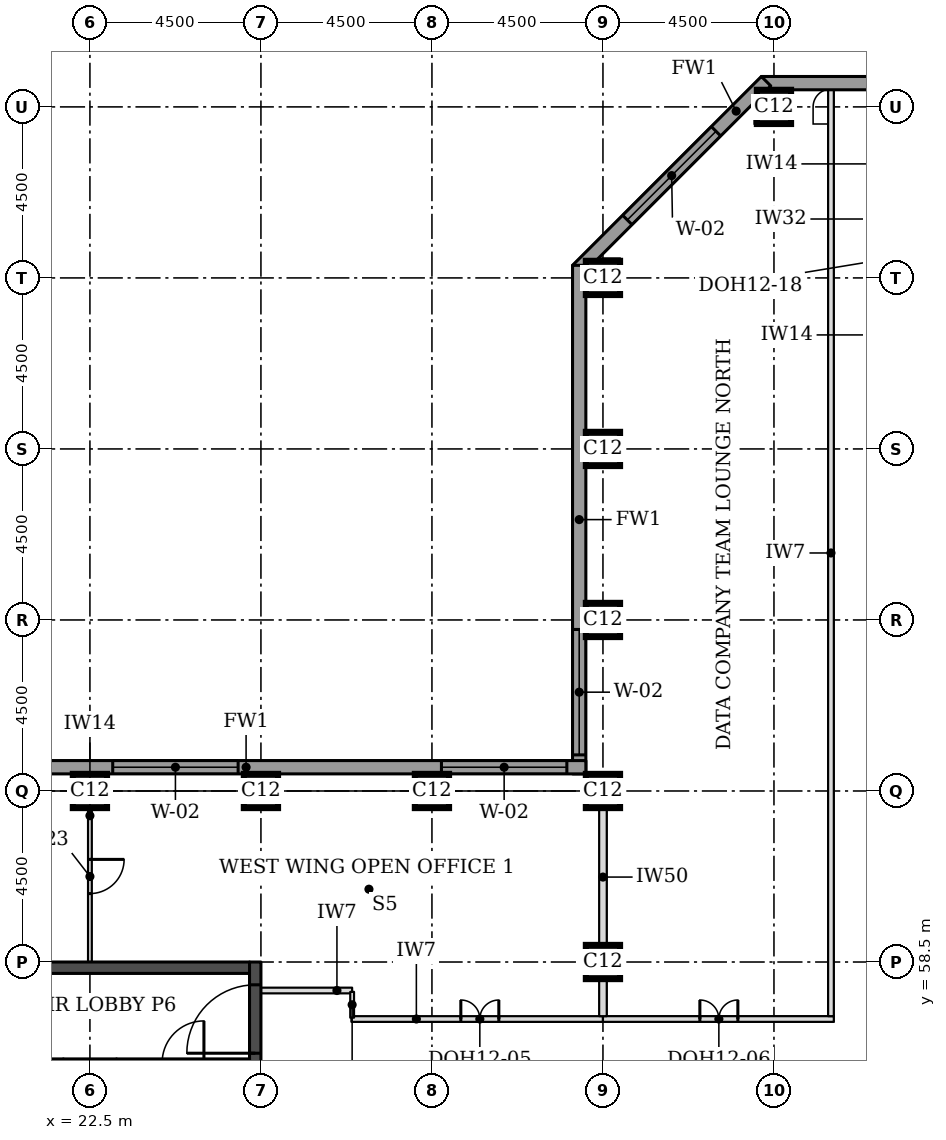
"""IFC4 building model, lengths in metres.
Left out: names, types, materials, properties, quantities, classifications, styles, units other than length and angle.
Written with IfcOpenShell. Run it as: python <this file> out.ifc"""

import sys

from ifc_helpers import new_model, si_unit, direction, frame, frame_2d, origin, origin_2d, place, context, subcontext, project, spatial, rectangle, extrude, element, fill, save


model = new_model("IFC4")
c1 = context("Model", 3, precision=1e-05, world=origin(), true_north=direction((0.0, 1.0)))
c2 = subcontext(c1, "Body", "Model", "MODEL_VIEW")
j1 = project(units=[si_unit("LENGTHUNIT", "METRE"), si_unit("PLANEANGLEUNIT", "RADIAN")], contexts=[c1])
p1 = place(None, origin())
s1 = spatial("IfcSite", under=j1, at=p1, CompositionType="ELEMENT")
p2 = place(p1, origin())
s2 = spatial("IfcBuilding", under=s1, at=p2, CompositionType="ELEMENT")
p3 = place(p2, frame((0.0, 0.0, 245.2)))
s3 = spatial("IfcBuildingStorey", under=s2, at=p3, CompositionType="ELEMENT", Elevation=245.2)
for number, where, z_axis, x_axis in (
    (1, (36.0, 58.5, 0.0), (0.0, 0.0, 1.0), (1.0, 0.0, 0.0)),
    (2, (22.5, 63.0, 0.0), (0.0, 0.0, 1.0), (1.0, 0.0, 0.0)),
    (3, (27.0, 63.0, 0.0), (0.0, 0.0, 1.0), (1.0, 0.0, 0.0)),
    (4, (31.5, 63.0, 0.0), (0.0, 0.0, 1.0), (1.0, 0.0, 0.0)),
    (5, (36.0, 63.0, 0.0), (0.0, 0.0, 1.0), (1.0, 0.0, 0.0)),
    (6, (36.0, 67.5, 0.0), (0.0, 0.0, 1.0), (1.0, 0.0, 0.0)),
    (7, (36.0, 72.0, 0.0), (0.0, 0.0, 1.0), (1.0, 0.0, 0.0)),
    (8, (36.0, 76.5, 0.0), (0.0, 0.0, 1.0), (1.0, 0.0, 0.0)),
    (9, (40.5, 81.0, 0.0), (0.0, 0.0, 1.0), (1.0, 0.0, 0.0)),
):
    element("IfcColumn", number, at=place(p3, frame(where, z_axis=z_axis, x_axis=x_axis)), inside=s3, PredefinedType="COLUMN", context=c2, shape_type="SweptSolid", body=[
        extrude(rectangle(XDim=0.9, YDim=0.9, at=origin_2d()), origin(), (0.0, 0.0, 1.0), 3.7),
    ])
p4 = place(p3, frame((18.3, 58.35, 0.0), z_axis=(0.0, 0.0, 1.0), x_axis=(1.0, 0.0, 0.0)))
e10 = element("IfcWall", 10, at=p4, inside=s3, PredefinedType="SHEAR", context=c2, shape_type="SweptSolid", body=[
    extrude(rectangle(XDim=8.4, YDim=0.3, at=frame_2d((4.2, 0.0))), origin(), (0.0, 0.0, 1.0), 3.7),
])
p5 = place(p3, frame((26.85, 49.5, 0.0), z_axis=(0.0, 0.0, 1.0), x_axis=(0.0, 1.0, 0.0)))
e11 = element("IfcWall", 11, at=p5, inside=s3, PredefinedType="SHEAR", context=c2, shape_type="SweptSolid", body=[
    extrude(rectangle(XDim=9.0, YDim=0.3, at=frame_2d((4.5, 0.0))), origin(), (0.0, 0.0, 1.0), 3.7),
])
p6 = place(p5, frame((6.6, 0.0, 0.0)))
e12 = element("IfcOpeningElement", 12, at=p6, cuts=e11, PredefinedType="OPENING", context=c2, shape_type="SweptSolid", body=[
    extrude(rectangle(XDim=1.8, YDim=2.1, at=frame_2d((0.9, 1.05))), frame((0.0, 0.16, 0.0), z_axis=(0.0, -1.0, 0.0), x_axis=(1.0, 0.0, 0.0)), (0.0, 0.0, 1.0), 0.32),
])
p7 = place(p3, frame((72.331, 81.625, 0.0), z_axis=(0.0, 0.0, 1.0), x_axis=(-1.0, 0.0, 0.0)))
e13 = element("IfcWall", 13, at=p7, inside=s3, PredefinedType="STANDARD", context=c2, shape_type="SweptSolid", body=[
    extrude(rectangle(XDim=32.163, YDim=0.35, at=frame_2d((16.081, 0.0))), origin(), (0.0, 0.0, 1.0), 3.525),
])
p8 = place(p7, frame((5.431, 0.0, 0.9)))
e14 = element("IfcOpeningElement", 14, at=p8, cuts=e13, PredefinedType="OPENING", context=c2, shape_type="SweptSolid", body=[
    extrude(rectangle(XDim=3.3, YDim=1.9, at=frame_2d((1.65, 0.95))), frame((0.0, 0.185, 0.0), z_axis=(0.0, -1.0, 0.0), x_axis=(1.0, 0.0, 0.0)), (0.0, 0.0, 1.0), 0.37),
])
p9 = place(p7, frame((9.931, 0.0, 0.9)))
e15 = element("IfcOpeningElement", 15, at=p9, cuts=e13, PredefinedType="OPENING", context=c2, shape_type="SweptSolid", body=[
    extrude(rectangle(XDim=3.3, YDim=1.9, at=frame_2d((1.65, 0.95))), frame((0.0, 0.185, 0.0), z_axis=(0.0, -1.0, 0.0), x_axis=(1.0, 0.0, 0.0)), (0.0, 0.0, 1.0), 0.37),
])
p10 = place(p7, frame((14.431, 0.0, 0.9)))
e16 = element("IfcOpeningElement", 16, at=p10, cuts=e13, PredefinedType="OPENING", context=c2, shape_type="SweptSolid", body=[
    extrude(rectangle(XDim=3.3, YDim=1.9, at=frame_2d((1.65, 0.95))), frame((0.0, 0.185, 0.0), z_axis=(0.0, -1.0, 0.0), x_axis=(1.0, 0.0, 0.0)), (0.0, 0.0, 1.0), 0.37),
])
p11 = place(p7, frame((18.931, 0.0, 0.9)))
e17 = element("IfcOpeningElement", 17, at=p11, cuts=e13, PredefinedType="OPENING", context=c2, shape_type="SweptSolid", body=[
    extrude(rectangle(XDim=3.3, YDim=1.9, at=frame_2d((1.65, 0.95))), frame((0.0, 0.185, 0.0), z_axis=(0.0, -1.0, 0.0), x_axis=(1.0, 0.0, 0.0)), (0.0, 0.0, 1.0), 0.37),
])
p12 = place(p7, frame((23.431, 0.0, 0.9)))
e18 = element("IfcOpeningElement", 18, at=p12, cuts=e13, PredefinedType="OPENING", context=c2, shape_type="SweptSolid", body=[
    extrude(rectangle(XDim=3.3, YDim=1.9, at=frame_2d((1.65, 0.95))), frame((0.0, 0.185, 0.0), z_axis=(0.0, -1.0, 0.0), x_axis=(1.0, 0.0, 0.0)), (0.0, 0.0, 1.0), 0.37),
])
p13 = place(p3, frame((40.292, 81.676, 0.0), z_axis=(0.0, 0.0, 1.0), x_axis=(-0.707106781187, -0.707106781187, 0.0)))
e19 = element("IfcWall", 19, at=p13, inside=s3, PredefinedType="STANDARD", context=c2, shape_type="SweptSolid", body=[
    extrude(rectangle(XDim=7.027, YDim=0.35, at=frame_2d((3.513, 0.0))), origin(), (0.0, 0.0, 1.0), 3.525),
])
p14 = place(p13, frame((1.863, 0.0, 0.9)))
e20 = element("IfcOpeningElement", 20, at=p14, cuts=e19, PredefinedType="OPENING", context=c2, shape_type="SweptSolid", body=[
    extrude(rectangle(XDim=3.3, YDim=1.9, at=frame_2d((1.65, 0.95))), frame((0.0, 0.185, 0.0), z_axis=(0.0, -1.0, 0.0), x_axis=(1.0, 0.0, 0.0)), (0.0, 0.0, 1.0), 0.37),
])
p15 = place(p3, frame((35.375, 76.831, 0.0), z_axis=(0.0, 0.0, 1.0), x_axis=(0.0, -1.0, 0.0)))
e21 = element("IfcWall", 21, at=p15, inside=s3, PredefinedType="STANDARD", context=c2, shape_type="SweptSolid", body=[
    extrude(rectangle(XDim=13.381, YDim=0.35, at=frame_2d((6.691, 0.0))), origin(), (0.0, 0.0, 1.0), 3.525),
])
p16 = place(p15, frame((9.581, 0.0, 0.9)))
e22 = element("IfcOpeningElement", 22, at=p16, cuts=e21, PredefinedType="OPENING", context=c2, shape_type="SweptSolid", body=[
    extrude(rectangle(XDim=3.3, YDim=1.9, at=frame_2d((1.65, 0.95))), frame((0.0, 0.185, 0.0), z_axis=(0.0, -1.0, 0.0), x_axis=(1.0, 0.0, 0.0)), (0.0, 0.0, 1.0), 0.37),
])
p17 = place(p3, frame((35.55, 63.625, 0.0), z_axis=(0.0, 0.0, 1.0), x_axis=(-1.0, 0.0, 0.0)))
e23 = element("IfcWall", 23, at=p17, inside=s3, PredefinedType="STANDARD", context=c2, shape_type="SweptSolid", body=[
    extrude(rectangle(XDim=17.881, YDim=0.35, at=frame_2d((8.941, 0.0))), origin(), (0.0, 0.0, 1.0), 3.525),
])
p18 = place(p17, frame((0.5, 0.0, 0.9)))
e24 = element("IfcOpeningElement", 24, at=p18, cuts=e23, PredefinedType="OPENING", context=c2, shape_type="SweptSolid", body=[
    extrude(rectangle(XDim=3.3, YDim=1.9, at=frame_2d((1.65, 0.95))), frame((0.0, 0.185, 0.0), z_axis=(0.0, -1.0, 0.0), x_axis=(1.0, 0.0, 0.0)), (0.0, 0.0, 1.0), 0.37),
])
p19 = place(p17, frame((9.15, 0.0, 0.9)))
e25 = element("IfcOpeningElement", 25, at=p19, cuts=e23, PredefinedType="OPENING", context=c2, shape_type="SweptSolid", body=[
    extrude(rectangle(XDim=3.3, YDim=1.9, at=frame_2d((1.65, 0.95))), frame((0.0, 0.185, 0.0), z_axis=(0.0, -1.0, 0.0), x_axis=(1.0, 0.0, 0.0)), (0.0, 0.0, 1.0), 0.37),
])
p20 = place(p3, frame((29.38, 57.0, 0.0), z_axis=(0.0, 0.0, 1.0), x_axis=(1.0, 0.0, 0.0)))
e26 = element("IfcWall", 26, at=p20, inside=s3, PredefinedType="PARTITIONING", context=c2, shape_type="SweptSolid", body=[
    extrude(rectangle(XDim=6.62, YDim=0.15, at=frame_2d((3.31, 0.0))), origin(), (0.0, 0.0, 1.0), 3.55),
])
p21 = place(p20, frame((2.88, 0.0, 0.0)))
e27 = element("IfcOpeningElement", 27, at=p21, cuts=e26, PredefinedType="OPENING", context=c2, shape_type="SweptSolid", body=[
    extrude(rectangle(XDim=1.0, YDim=2.1, at=frame_2d((0.5, 1.05))), frame((0.0, 0.085, 0.0), z_axis=(0.0, -1.0, 0.0), x_axis=(1.0, 0.0, 0.0)), (0.0, 0.0, 1.0), 0.17),
])
p22 = place(p3, frame((36.0, 57.0, 0.0), z_axis=(0.0, 0.0, 1.0), x_axis=(1.0, 0.0, 0.0)))
e28 = element("IfcWall", 28, at=p22, inside=s3, PredefinedType="PARTITIONING", context=c2, shape_type="SweptSolid", body=[
    extrude(rectangle(XDim=6.075, YDim=0.15, at=frame_2d((3.038, 0.0))), origin(), (0.0, 0.0, 1.0), 3.55),
])
p23 = place(p22, frame((2.55, 0.0, 0.0)))
e29 = element("IfcOpeningElement", 29, at=p23, cuts=e28, PredefinedType="OPENING", context=c2, shape_type="SweptSolid", body=[
    extrude(rectangle(XDim=1.0, YDim=2.1, at=frame_2d((0.5, 1.05))), frame((0.0, 0.085, 0.0), z_axis=(0.0, -1.0, 0.0), x_axis=(1.0, 0.0, 0.0)), (0.0, 0.0, 1.0), 0.17),
])
p24 = place(p3, frame((36.0, 57.075, 0.0), z_axis=(0.0, 0.0, 1.0), x_axis=(0.0, 1.0, 0.0)))
e30 = element("IfcWall", 30, at=p24, inside=s3, PredefinedType="PARTITIONING", context=c2, shape_type="SweptSolid", body=[
    extrude(rectangle(XDim=0.975, YDim=0.2, at=frame_2d((0.488, 0.0))), origin(), (0.0, 0.0, 1.0), 2.8),
])
p25 = place(p3, frame((42.0, 57.075, 0.0), z_axis=(0.0, 0.0, 1.0), x_axis=(0.0, 1.0, 0.0)))
e31 = element("IfcWall", 31, at=p25, inside=s3, PredefinedType="PARTITIONING", context=c2, shape_type="SweptSolid", body=[
    extrude(rectangle(XDim=24.375, YDim=0.15, at=frame_2d((12.188, 0.0))), origin(), (0.0, 0.0, 1.0), 3.55),
])
p26 = place(p3, frame((36.0, 58.92, 0.0), z_axis=(0.0, 0.0, 1.0), x_axis=(0.0, 1.0, 0.0)))
e32 = element("IfcWall", 32, at=p26, inside=s3, PredefinedType="PARTITIONING", context=c2, shape_type="SweptSolid", body=[
    extrude(rectangle(XDim=3.63, YDim=0.2, at=frame_2d((1.815, 0.0))), origin(), (0.0, 0.0, 1.0), 2.8),
])
p27 = place(p3, frame((22.5, 63.0, 0.0), z_axis=(0.0, 0.0, 1.0), x_axis=(0.0, -1.0, 0.0)))
e33 = element("IfcWall", 33, at=p27, inside=s3, PredefinedType="PARTITIONING", context=c2, shape_type="SweptSolid", body=[
    extrude(rectangle(XDim=4.5, YDim=0.1, at=frame_2d((2.25, 0.0))), origin(), (0.0, 0.0, 1.0), 3.55),
])
p28 = place(p27, frame((1.8, 0.0, 0.0)))
e34 = element("IfcOpeningElement", 34, at=p28, cuts=e33, PredefinedType="OPENING", context=c2, shape_type="SweptSolid", body=[
    extrude(rectangle(XDim=0.9, YDim=2.1, at=frame_2d((0.45, 1.05))), frame((0.0, 0.06, 0.0), z_axis=(0.0, -1.0, 0.0), x_axis=(1.0, 0.0, 0.0)), (0.0, 0.0, 1.0), 0.12),
])
p29 = place(p3, frame((27.0, 57.75, 0.0), z_axis=(0.0, 0.0, 1.0), x_axis=(1.0, 0.0, 0.0)))
e35 = element("IfcWall", 35, at=p29, inside=s3, PredefinedType="PARTITIONING", context=c2, shape_type="SweptSolid", body=[
    extrude(rectangle(XDim=2.4, YDim=0.15, at=frame_2d((1.2, 0.0))), origin(), (0.0, 0.0, 1.0), 3.55),
])
p30 = place(p3, frame((29.4, 57.715, 0.0), z_axis=(0.0, 0.0, 1.0), x_axis=(0.0, -1.0, 0.0)))
e36 = element("IfcWall", 36, at=p30, inside=s3, PredefinedType="PARTITIONING", context=c2, shape_type="SweptSolid", body=[
    extrude(rectangle(XDim=0.68, YDim=0.1, at=frame_2d((0.34, 0.0))), origin(), (0.0, 0.0, 1.0), 3.55),
])
p31 = place(p3, frame((21.8, 55.85, 0.0), z_axis=(0.0, 0.0, 1.0), x_axis=(1.0, 0.0, 0.0)))
e37 = element("IfcWall", 37, at=p31, inside=s3, PredefinedType="SOLIDWALL", context=c2, shape_type="SweptSolid", body=[
    extrude(rectangle(XDim=1.4, YDim=0.2, at=frame_2d((0.7, 0.0))), origin(), (0.0, 0.0, 1.0), 3.55),
])
p32 = place(p3, frame((18.3, 55.85, 0.0), z_axis=(0.0, 0.0, 1.0), x_axis=(1.0, 0.0, 0.0)))
e38 = element("IfcWall", 38, at=p32, inside=s3, PredefinedType="SOLIDWALL", context=c2, shape_type="SweptSolid", body=[
    extrude(rectangle(XDim=3.5, YDim=0.2, at=frame_2d((1.75, 0.0))), origin(), (0.0, 0.0, 1.0), 3.55),
])
p33 = place(p32, frame((1.2, 0.0, 0.0)))
e39 = element("IfcOpeningElement", 39, at=p33, cuts=e38, PredefinedType="OPENING", context=c2, shape_type="SweptSolid", body=[
    extrude(rectangle(XDim=1.1, YDim=2.1, at=frame_2d((0.55, 1.05))), frame((0.0, 0.11, 0.0), z_axis=(0.0, -1.0, 0.0), x_axis=(1.0, 0.0, 0.0)), (0.0, 0.0, 1.0), 0.22),
])
p34 = place(p3, frame((23.2, 55.85, 0.0), z_axis=(0.0, 0.0, 1.0), x_axis=(1.0, 0.0, 0.0)))
e40 = element("IfcWall", 40, at=p34, inside=s3, PredefinedType="SOLIDWALL", context=c2, shape_type="SweptSolid", body=[
    extrude(rectangle(XDim=3.5, YDim=0.2, at=frame_2d((1.75, 0.0))), origin(), (0.0, 0.0, 1.0), 3.55),
])
p35 = place(p34, frame((1.2, 0.0, 0.0)))
e41 = element("IfcOpeningElement", 41, at=p35, cuts=e40, PredefinedType="OPENING", context=c2, shape_type="SweptSolid", body=[
    extrude(rectangle(XDim=1.1, YDim=2.1, at=frame_2d((0.55, 1.05))), frame((0.0, 0.11, 0.0), z_axis=(0.0, -1.0, 0.0), x_axis=(1.0, 0.0, 0.0)), (0.0, 0.0, 1.0), 0.22),
])
p36 = place(p14, origin())
e42 = element("IfcWindow", 42, at=p36, inside=s3, PartitioningType="SINGLE_PANEL", PredefinedType="WINDOW", context=c2, shape_type="SweptSolid", body=[
    extrude(rectangle(XDim=3.3, YDim=1.9, at=frame_2d((1.65, 0.95))), frame((0.0, 0.085, 0.0), z_axis=(0.0, -1.0, 0.0), x_axis=(1.0, 0.0, 0.0)), (0.0, 0.0, 1.0), 0.06),
])
fill(e20, e42)
p37 = place(p16, origin())
e43 = element("IfcWindow", 43, at=p37, inside=s3, PartitioningType="SINGLE_PANEL", PredefinedType="WINDOW", context=c2, shape_type="SweptSolid", body=[
    extrude(rectangle(XDim=3.3, YDim=1.9, at=frame_2d((1.65, 0.95))), frame((0.0, 0.085, 0.0), z_axis=(0.0, -1.0, 0.0), x_axis=(1.0, 0.0, 0.0)), (0.0, 0.0, 1.0), 0.06),
])
fill(e22, e43)
p38 = place(p18, origin())
e44 = element("IfcWindow", 44, at=p38, inside=s3, PartitioningType="SINGLE_PANEL", PredefinedType="WINDOW", context=c2, shape_type="SweptSolid", body=[
    extrude(rectangle(XDim=3.3, YDim=1.9, at=frame_2d((1.65, 0.95))), frame((0.0, 0.085, 0.0), z_axis=(0.0, -1.0, 0.0), x_axis=(1.0, 0.0, 0.0)), (0.0, 0.0, 1.0), 0.06),
])
fill(e24, e44)
p39 = place(p19, origin())
e45 = element("IfcWindow", 45, at=p39, inside=s3, PartitioningType="SINGLE_PANEL", PredefinedType="WINDOW", context=c2, shape_type="SweptSolid", body=[
    extrude(rectangle(XDim=3.3, YDim=1.9, at=frame_2d((1.65, 0.95))), frame((0.0, 0.085, 0.0), z_axis=(0.0, -1.0, 0.0), x_axis=(1.0, 0.0, 0.0)), (0.0, 0.0, 1.0), 0.06),
])
fill(e25, e45)
p40 = place(p23, origin())
e46 = element("IfcDoor", 46, at=p40, inside=s3, OperationType="DOUBLE_DOOR_SINGLE_SWING", PredefinedType="DOOR", context=c2, shape_type="SweptSolid", body=[
    extrude(rectangle(XDim=1.0, YDim=2.1, at=frame_2d((0.5, 1.05))), frame((0.0, 0.025, 0.0), z_axis=(0.0, -1.0, 0.0), x_axis=(1.0, 0.0, 0.0)), (0.0, 0.0, 1.0), 0.05),
])
fill(e29, e46)
p41 = place(p21, origin())
e47 = element("IfcDoor", 47, at=p41, inside=s3, OperationType="DOUBLE_DOOR_SINGLE_SWING", PredefinedType="DOOR", context=c2, shape_type="SweptSolid", body=[
    extrude(rectangle(XDim=1.0, YDim=2.1, at=frame_2d((0.5, 1.05))), frame((0.0, 0.025, 0.0), z_axis=(0.0, -1.0, 0.0), x_axis=(1.0, 0.0, 0.0)), (0.0, 0.0, 1.0), 0.05),
])
fill(e27, e47)
p42 = place(p28, origin())
e48 = element("IfcDoor", 48, at=p42, inside=s3, OperationType="SINGLE_SWING_LEFT", PredefinedType="DOOR", context=c2, shape_type="SweptSolid", body=[
    extrude(rectangle(XDim=0.9, YDim=2.1, at=frame_2d((0.45, 1.05))), frame((0.0, 0.025, 0.0), z_axis=(0.0, -1.0, 0.0), x_axis=(1.0, 0.0, 0.0)), (0.0, 0.0, 1.0), 0.05),
])
fill(e34, e48)
p43 = place(p6, origin())
e49 = element("IfcDoor", 49, at=p43, inside=s3, OperationType="SINGLE_SWING_LEFT", PredefinedType="DOOR", context=c2, shape_type="SweptSolid", body=[
    extrude(rectangle(XDim=1.8, YDim=2.1, at=frame_2d((0.9, 1.05))), frame((0.0, 0.025, 0.0), z_axis=(0.0, -1.0, 0.0), x_axis=(1.0, 0.0, 0.0)), (0.0, 0.0, 1.0), 0.05),
])
fill(e12, e49)
save(model, sys.argv[1])
